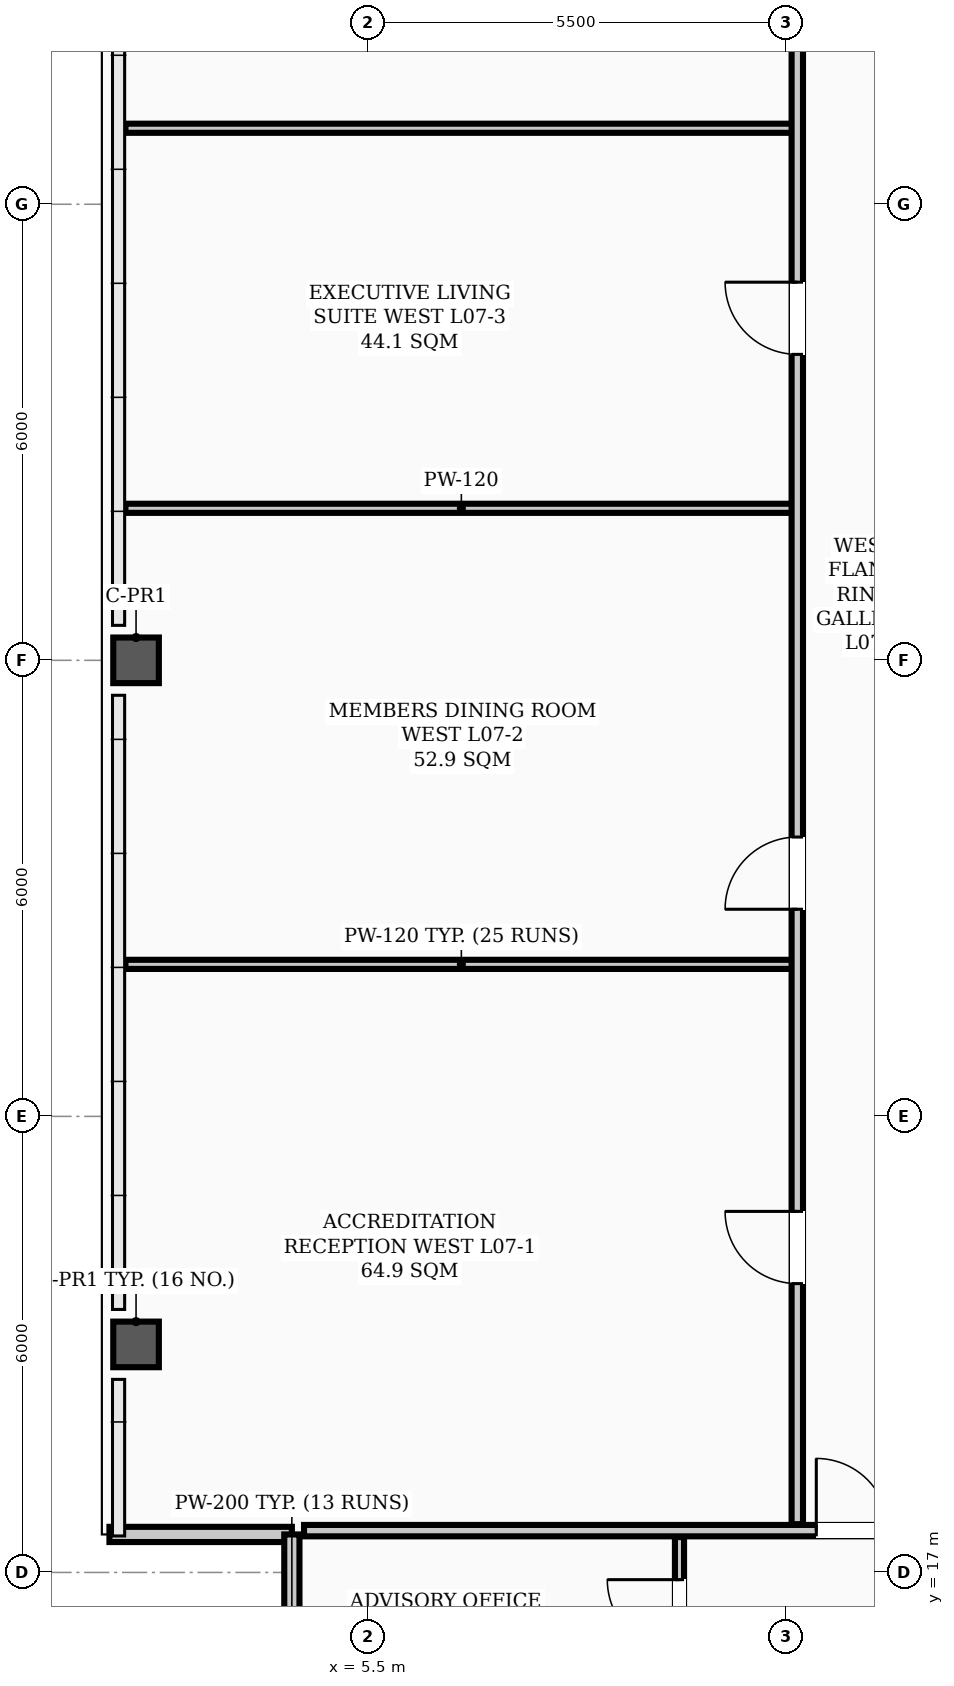
"""IFC4 building model, lengths in metres.
Left out: names, types, materials, properties, quantities, classifications, styles, units other than length and angle.
Written with IfcOpenShell. Run it as: python <this file> out.ifc"""

import sys

from ifc_helpers import new_model, si_unit, direction, frame, frame_2d, origin, origin_2d, place, context, subcontext, project, spatial, rectangle, hollow_rectangle, extrude, element, fill, save


model = new_model("IFC4")
c1 = context("Model", 3, precision=1e-05, world=origin(), true_north=direction((0.0, 1.0)))
c2 = subcontext(c1, "Body", "Model", "MODEL_VIEW")
j1 = project(units=[si_unit("LENGTHUNIT", "METRE"), si_unit("PLANEANGLEUNIT", "RADIAN")], contexts=[c1])
p1 = place(None, origin())
s1 = spatial("IfcSite", under=j1, at=p1, CompositionType="ELEMENT")
p2 = place(p1, origin())
s2 = spatial("IfcBuilding", under=s1, at=p2, CompositionType="ELEMENT")
p3 = place(p2, frame((0.0, 0.0, 30.4)))
s3 = spatial("IfcBuildingStorey", under=s2, at=p3, CompositionType="ELEMENT", Elevation=30.4)
for number, where, z_axis, x_axis in (
    (1, (2.45, 20.0, 0.0), (0.0, 0.0, 1.0), (1.0, 0.0, 0.0)),
    (2, (2.45, 29.0, 0.0), (0.0, 0.0, 1.0), (1.0, 0.0, 0.0)),
):
    element("IfcColumn", number, at=place(p3, frame(where, z_axis=z_axis, x_axis=x_axis)), inside=s3, PredefinedType="COLUMN", context=c2, shape_type="SweptSolid", body=[
        extrude(hollow_rectangle(XDim=0.6, YDim=0.6, WallThickness=0.026, InnerFilletRadius=0.013, OuterFilletRadius=0.039, at=origin_2d()), origin(), (0.0, 0.0, 1.0), 3.9),
    ])
for number, where, z_axis, x_axis in (
    (3, (2.1, 17.5, 0.0), (0.0, 0.0, 1.0), (1.0, 0.0, 0.0)),
    (4, (4.5, 17.5, 0.0), (0.0, 0.0, 1.0), (0.0, -1.0, 0.0)),
):
    element("IfcWall", number, at=place(p3, frame(where, z_axis=z_axis, x_axis=x_axis)), inside=s3, PredefinedType="PARAPET", context=c2, shape_type="SweptSolid", body=[
        extrude(rectangle(XDim=2.4, YDim=0.2, at=frame_2d((1.2, 0.0))), origin(), (0.0, 0.0, 1.0), 1.2),
    ])
p4 = place(p3, frame((4.66, 17.55, 0.0), z_axis=(0.0, 0.0, 1.0), x_axis=(1.0, 0.0, 0.0)))
e5 = element("IfcWall", 5, at=p4, inside=s3, PredefinedType="PARTITIONING", context=c2, shape_type="SweptSolid", body=[
    extrude(rectangle(XDim=44.68, YDim=0.15, at=frame_2d((22.34, 0.0))), origin(), (0.0, 0.0, 1.0), 3.1),
])
p5 = place(p4, frame((6.74, 0.0, 0.0)))
e6 = element("IfcOpeningElement", 6, at=p5, cuts=e5, PredefinedType="OPENING", context=c2, shape_type="SweptSolid", body=[
    extrude(rectangle(XDim=0.95, YDim=2.08, at=frame_2d((0.475, 1.04))), frame((0.0, 0.085, 0.0), z_axis=(0.0, -1.0, 0.0), x_axis=(1.0, 0.0, 0.0)), (0.0, 0.0, 1.0), 0.17),
])
p6 = place(p4, frame((13.865, 0.0, 0.0)))
e7 = element("IfcOpeningElement", 7, at=p6, cuts=e5, PredefinedType="OPENING", context=c2, shape_type="SweptSolid", body=[
    extrude(rectangle(XDim=0.95, YDim=2.08, at=frame_2d((0.475, 1.04))), frame((0.0, 0.085, 0.0), z_axis=(0.0, -1.0, 0.0), x_axis=(1.0, 0.0, 0.0)), (0.0, 0.0, 1.0), 0.17),
])
p7 = place(p4, frame((28.765, 0.0, 0.0)))
e8 = element("IfcOpeningElement", 8, at=p7, cuts=e5, PredefinedType="OPENING", context=c2, shape_type="SweptSolid", body=[
    extrude(rectangle(XDim=0.95, YDim=2.08, at=frame_2d((0.475, 1.04))), frame((0.0, 0.085, 0.0), z_axis=(0.0, -1.0, 0.0), x_axis=(1.0, 0.0, 0.0)), (0.0, 0.0, 1.0), 0.17),
])
p8 = place(p4, frame((34.465, 0.0, 0.0)))
e9 = element("IfcOpeningElement", 9, at=p8, cuts=e5, PredefinedType="OPENING", context=c2, shape_type="SweptSolid", body=[
    extrude(rectangle(XDim=0.95, YDim=2.08, at=frame_2d((0.475, 1.04))), frame((0.0, 0.085, 0.0), z_axis=(0.0, -1.0, 0.0), x_axis=(1.0, 0.0, 0.0)), (0.0, 0.0, 1.0), 0.17),
])
p9 = place(p4, frame((39.24, 0.0, 0.0)))
e10 = element("IfcOpeningElement", 10, at=p9, cuts=e5, PredefinedType="OPENING", context=c2, shape_type="SweptSolid", body=[
    extrude(rectangle(XDim=0.95, YDim=2.08, at=frame_2d((0.475, 1.04))), frame((0.0, 0.085, 0.0), z_axis=(0.0, -1.0, 0.0), x_axis=(1.0, 0.0, 0.0)), (0.0, 0.0, 1.0), 0.17),
])
for number, where, z_axis, x_axis in (
    (11, (2.31, 25.0, 0.0), (0.0, 0.0, 1.0), (1.0, 0.0, 0.0)),
    (12, (2.31, 31.0, 0.0), (0.0, 0.0, 1.0), (1.0, 0.0, 0.0)),
    (13, (2.31, 36.0, 0.0), (0.0, 0.0, 1.0), (1.0, 0.0, 0.0)),
):
    element("IfcWall", number, at=place(p3, frame(where, z_axis=z_axis, x_axis=x_axis)), inside=s3, PredefinedType="PARTITIONING", context=c2, shape_type="SweptSolid", body=[
        extrude(rectangle(XDim=8.84, YDim=0.12, at=frame_2d((4.42, 0.0))), origin(), (0.0, 0.0, 1.0), 3.212),
    ])
p10 = place(p3, frame((11.15, 17.635, 0.0), z_axis=(0.0, 0.0, 1.0), x_axis=(0.0, 1.0, 0.0)))
e14 = element("IfcWall", 14, at=p10, inside=s3, PredefinedType="PARTITIONING", context=c2, shape_type="SweptSolid", body=[
    extrude(rectangle(XDim=22.53, YDim=0.15, at=frame_2d((11.265, 0.0))), origin(), (0.0, 0.0, 1.0), 3.0),
])
p11 = place(p10, frame((3.165, 0.0, 0.0)))
e15 = element("IfcOpeningElement", 15, at=p11, cuts=e14, PredefinedType="OPENING", context=c2, shape_type="SweptSolid", body=[
    extrude(rectangle(XDim=0.95, YDim=2.08, at=frame_2d((0.475, 1.04))), frame((0.0, 0.085, 0.0), z_axis=(0.0, -1.0, 0.0), x_axis=(1.0, 0.0, 0.0)), (0.0, 0.0, 1.0), 0.17),
])
p12 = place(p10, frame((8.09, 0.0, 0.0)))
e16 = element("IfcOpeningElement", 16, at=p12, cuts=e14, PredefinedType="OPENING", context=c2, shape_type="SweptSolid", body=[
    extrude(rectangle(XDim=0.95, YDim=2.08, at=frame_2d((0.475, 1.04))), frame((0.0, 0.085, 0.0), z_axis=(0.0, -1.0, 0.0), x_axis=(1.0, 0.0, 0.0)), (0.0, 0.0, 1.0), 0.17),
])
p13 = place(p10, frame((15.39, 0.0, 0.0)))
e17 = element("IfcOpeningElement", 17, at=p13, cuts=e14, PredefinedType="OPENING", context=c2, shape_type="SweptSolid", body=[
    extrude(rectangle(XDim=0.95, YDim=2.08, at=frame_2d((0.475, 1.04))), frame((0.0, 0.085, 0.0), z_axis=(0.0, -1.0, 0.0), x_axis=(1.0, 0.0, 0.0)), (0.0, 0.0, 1.0), 0.17),
])
p14 = place(p10, frame((20.015, 0.0, 0.0)))
e18 = element("IfcOpeningElement", 18, at=p14, cuts=e14, PredefinedType="OPENING", context=c2, shape_type="SweptSolid", body=[
    extrude(rectangle(XDim=0.95, YDim=2.08, at=frame_2d((0.475, 1.04))), frame((0.0, 0.085, 0.0), z_axis=(0.0, -1.0, 0.0), x_axis=(1.0, 0.0, 0.0)), (0.0, 0.0, 1.0), 0.17),
])
p15 = place(p3, frame((9.6, 15.31, 0.0), z_axis=(0.0, 0.0, 1.0), x_axis=(0.0, 1.0, 0.0)))
e19 = element("IfcWall", 19, at=p15, inside=s3, PredefinedType="PARTITIONING", context=c2, shape_type="SweptSolid", body=[
    extrude(rectangle(XDim=2.155, YDim=0.12, at=frame_2d((1.078, 0.0))), origin(), (0.0, 0.0, 1.0), 3.72),
])
p16 = place(p15, frame((0.645, 0.0, 0.0)))
e20 = element("IfcOpeningElement", 20, at=p16, cuts=e19, PredefinedType="OPENING", context=c2, shape_type="SweptSolid", body=[
    extrude(rectangle(XDim=0.95, YDim=2.08, at=frame_2d((0.475, 1.04))), frame((0.0, 0.07, 0.0), z_axis=(0.0, -1.0, 0.0), x_axis=(1.0, 0.0, 0.0)), (0.0, 0.0, 1.0), 0.14),
])
p17 = place(p16, origin())
e21 = element("IfcDoor", 21, at=p17, inside=s3, OperationType="SINGLE_SWING_RIGHT", PredefinedType="DOOR", context=c2, shape_type="SweptSolid", body=[
    extrude(rectangle(XDim=0.95, YDim=2.08, at=frame_2d((0.475, 1.04))), frame((0.0, 0.025, 0.0), z_axis=(0.0, -1.0, 0.0), x_axis=(1.0, 0.0, 0.0)), (0.0, 0.0, 1.0), 0.05),
])
fill(e20, e21)
p18 = place(p5, origin())
e22 = element("IfcDoor", 22, at=p18, inside=s3, OperationType="SINGLE_SWING_LEFT", PredefinedType="DOOR", context=c2, shape_type="SweptSolid", body=[
    extrude(rectangle(XDim=0.95, YDim=2.08, at=frame_2d((0.475, 1.04))), frame((0.0, 0.025, 0.0), z_axis=(0.0, -1.0, 0.0), x_axis=(1.0, 0.0, 0.0)), (0.0, 0.0, 1.0), 0.05),
])
fill(e6, e22)
p19 = place(p11, origin())
e23 = element("IfcDoor", 23, at=p19, inside=s3, OperationType="SINGLE_SWING_RIGHT", PredefinedType="DOOR", context=c2, shape_type="SweptSolid", body=[
    extrude(rectangle(XDim=0.95, YDim=2.08, at=frame_2d((0.475, 1.04))), frame((0.0, 0.025, 0.0), z_axis=(0.0, -1.0, 0.0), x_axis=(1.0, 0.0, 0.0)), (0.0, 0.0, 1.0), 0.05),
])
fill(e15, e23)
p20 = place(p12, origin())
e24 = element("IfcDoor", 24, at=p20, inside=s3, OperationType="SINGLE_SWING_LEFT", PredefinedType="DOOR", context=c2, shape_type="SweptSolid", body=[
    extrude(rectangle(XDim=0.95, YDim=2.08, at=frame_2d((0.475, 1.04))), frame((0.0, 0.025, 0.0), z_axis=(0.0, -1.0, 0.0), x_axis=(1.0, 0.0, 0.0)), (0.0, 0.0, 1.0), 0.05),
])
fill(e16, e24)
p21 = place(p13, origin())
e25 = element("IfcDoor", 25, at=p21, inside=s3, OperationType="SINGLE_SWING_RIGHT", PredefinedType="DOOR", context=c2, shape_type="SweptSolid", body=[
    extrude(rectangle(XDim=0.95, YDim=2.08, at=frame_2d((0.475, 1.04))), frame((0.0, 0.025, 0.0), z_axis=(0.0, -1.0, 0.0), x_axis=(1.0, 0.0, 0.0)), (0.0, 0.0, 1.0), 0.05),
])
fill(e17, e25)
save(model, sys.argv[1])
